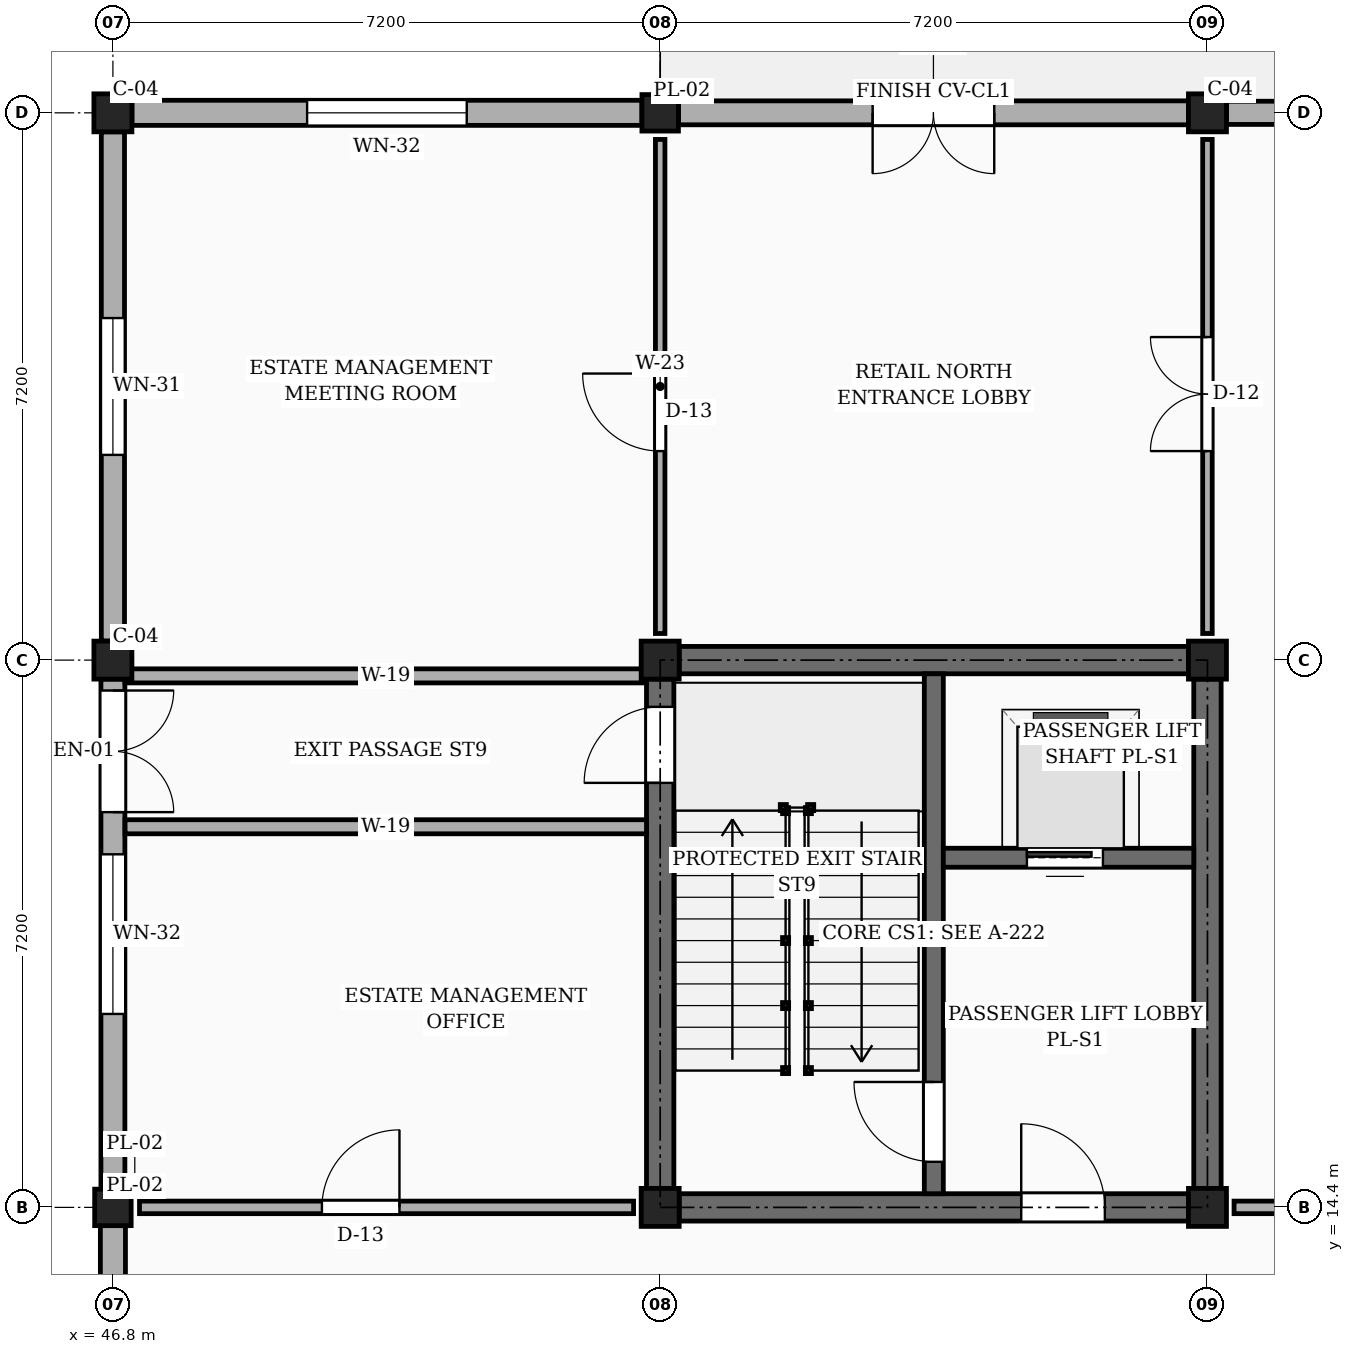
"""IFC4 building model, lengths in metres.
Left out: names, types, materials, properties, quantities, classifications, styles, units other than length and angle.
Written with IfcOpenShell. Run it as: python <this file> out.ifc"""

import sys

from ifc_helpers import new_model, si_unit, direction, frame, frame_2d, origin, origin_2d, place, context, subcontext, project, spatial, rectangle, extrude, element, fill, save


model = new_model("IFC4")
c1 = context("Model", 3, precision=1e-05, world=origin(), true_north=direction((0.0, 1.0)))
c2 = subcontext(c1, "Body", "Model", "MODEL_VIEW")
j1 = project(units=[si_unit("LENGTHUNIT", "METRE"), si_unit("PLANEANGLEUNIT", "RADIAN")], contexts=[c1])
p1 = place(None, origin())
s1 = spatial("IfcSite", under=j1, at=p1, CompositionType="ELEMENT")
p2 = place(p1, origin())
s2 = spatial("IfcBuilding", under=s1, at=p2, CompositionType="ELEMENT")
p3 = place(p2, origin())
s3 = spatial("IfcBuildingStorey", under=s2, at=p3, CompositionType="ELEMENT", Elevation=0.0)
p4 = place(p3, frame((46.8, 14.4, 0.0), z_axis=(0.0, 0.0, 1.0), x_axis=(1.0, 0.0, 0.0)))
e1 = element("IfcColumn", 1, at=p4, inside=s3, PredefinedType="PILASTER", context=c2, shape_type="SweptSolid", body=[
    extrude(rectangle(XDim=0.48, YDim=0.48, at=origin_2d()), origin(), (0.0, 0.0, 1.0), 4.5),
])
for number, where, z_axis, x_axis in (
    (2, (46.8, 21.6, 0.0), (0.0, 0.0, 1.0), (1.0, 0.0, 0.0)),
    (3, (46.8, 28.8, 0.0), (0.0, 0.0, 1.0), (1.0, 0.0, 0.0)),
    (4, (54.0, 14.4, 0.0), (0.0, 0.0, 1.0), (1.0, 0.0, 0.0)),
    (5, (54.0, 21.6, 0.0), (0.0, 0.0, 1.0), (1.0, 0.0, 0.0)),
):
    element("IfcColumn", number, at=place(p3, frame(where, z_axis=z_axis, x_axis=x_axis)), inside=s3, PredefinedType="COLUMN", context=c2, shape_type="SweptSolid", body=[
        extrude(rectangle(XDim=0.5, YDim=0.5, at=origin_2d()), origin(), (0.0, 0.0, 1.0), 4.5),
    ])
p5 = place(p3, frame((54.0, 28.8, 0.0), z_axis=(0.0, 0.0, 1.0), x_axis=(1.0, 0.0, 0.0)))
e6 = element("IfcColumn", 6, at=p5, inside=s3, PredefinedType="PILASTER", context=c2, shape_type="SweptSolid", body=[
    extrude(rectangle(XDim=0.48, YDim=0.48, at=origin_2d()), origin(), (0.0, 0.0, 1.0), 4.5),
])
for number, where, z_axis, x_axis in (
    (7, (61.2, 14.4, 0.0), (0.0, 0.0, 1.0), (1.0, 0.0, 0.0)),
    (8, (61.2, 21.6, 0.0), (0.0, 0.0, 1.0), (1.0, 0.0, 0.0)),
    (9, (61.2, 28.8, 0.0), (0.0, 0.0, 1.0), (1.0, 0.0, 0.0)),
):
    element("IfcColumn", number, at=place(p3, frame(where, z_axis=z_axis, x_axis=x_axis)), inside=s3, PredefinedType="COLUMN", context=c2, shape_type="SweptSolid", body=[
        extrude(rectangle(XDim=0.5, YDim=0.5, at=origin_2d()), origin(), (0.0, 0.0, 1.0), 4.5),
    ])
p6 = place(p3, frame((68.15, 28.8, 0.0), z_axis=(0.0, 0.0, 1.0), x_axis=(-1.0, 0.0, 0.0)))
e10 = element("IfcWall", 10, at=p6, inside=s3, PredefinedType="SOLIDWALL", context=c2, shape_type="SweptSolid", body=[
    extrude(rectangle(XDim=6.7, YDim=0.305, at=frame_2d((3.35, 0.0))), origin(), (0.0, 0.0, 1.0), 3.83),
])
p7 = place(p6, frame((2.45, 0.0, 0.85)))
e11 = element("IfcOpeningElement", 11, at=p7, cuts=e10, PredefinedType="OPENING", context=c2, shape_type="SweptSolid", body=[
    extrude(rectangle(XDim=1.8, YDim=2.1, at=frame_2d((0.9, 1.05))), frame((0.0, 0.163, 0.0), z_axis=(0.0, -1.0, 0.0), x_axis=(1.0, 0.0, 0.0)), (0.0, 0.0, 1.0), 0.325),
])
p8 = place(p3, frame((60.95, 28.8, 0.0), z_axis=(0.0, 0.0, 1.0), x_axis=(-1.0, 0.0, 0.0)))
e12 = element("IfcWall", 12, at=p8, inside=s3, PredefinedType="SOLIDWALL", context=c2, shape_type="SweptSolid", body=[
    extrude(rectangle(XDim=6.71, YDim=0.315, at=frame_2d((3.355, 0.0))), origin(), (0.0, 0.0, 1.0), 3.83),
])
p9 = place(p8, frame((2.555, 0.0, 0.0)))
e13 = element("IfcOpeningElement", 13, at=p9, cuts=e12, PredefinedType="OPENING", context=c2, shape_type="SweptSolid", body=[
    extrude(rectangle(XDim=1.6, YDim=2.25, at=frame_2d((0.8, 1.125))), frame((0.0, 0.167, 0.0), z_axis=(0.0, -1.0, 0.0), x_axis=(1.0, 0.0, 0.0)), (0.0, 0.0, 1.0), 0.335),
])
p10 = place(p3, frame((53.76, 28.8, 0.0), z_axis=(0.0, 0.0, 1.0), x_axis=(-1.0, 0.0, 0.0)))
e14 = element("IfcWall", 14, at=p10, inside=s3, PredefinedType="SOLIDWALL", context=c2, shape_type="SweptSolid", body=[
    extrude(rectangle(XDim=6.71, YDim=0.33, at=frame_2d((3.355, 0.0))), origin(), (0.0, 0.0, 1.0), 3.83),
])
p11 = place(p10, frame((2.305, 0.0, 0.85)))
e15 = element("IfcOpeningElement", 15, at=p11, cuts=e14, PredefinedType="OPENING", context=c2, shape_type="SweptSolid", body=[
    extrude(rectangle(XDim=2.1, YDim=2.1, at=frame_2d((1.05, 1.05))), frame((0.0, 0.175, 0.0), z_axis=(0.0, -1.0, 0.0), x_axis=(1.0, 0.0, 0.0)), (0.0, 0.0, 1.0), 0.35),
])
p12 = place(p3, frame((46.8, 28.55, 0.0), z_axis=(0.0, 0.0, 1.0), x_axis=(0.0, -1.0, 0.0)))
e16 = element("IfcWall", 16, at=p12, inside=s3, PredefinedType="SOLIDWALL", context=c2, shape_type="SweptSolid", body=[
    extrude(rectangle(XDim=6.7, YDim=0.305, at=frame_2d((3.35, 0.0))), origin(), (0.0, 0.0, 1.0), 3.83),
])
p13 = place(p12, frame((2.45, 0.0, 0.85)))
e17 = element("IfcOpeningElement", 17, at=p13, cuts=e16, PredefinedType="OPENING", context=c2, shape_type="SweptSolid", body=[
    extrude(rectangle(XDim=1.8, YDim=2.1, at=frame_2d((0.9, 1.05))), frame((0.0, 0.163, 0.0), z_axis=(0.0, -1.0, 0.0), x_axis=(1.0, 0.0, 0.0)), (0.0, 0.0, 1.0), 0.325),
])
p14 = place(p3, frame((46.8, 21.35, 0.0), z_axis=(0.0, 0.0, 1.0), x_axis=(0.0, -1.0, 0.0)))
e18 = element("IfcWall", 18, at=p14, inside=s3, PredefinedType="SOLIDWALL", context=c2, shape_type="SweptSolid", body=[
    extrude(rectangle(XDim=6.71, YDim=0.315, at=frame_2d((3.355, 0.0))), origin(), (0.0, 0.0, 1.0), 3.83),
])
p15 = place(p14, frame((2.305, 0.0, 0.85)))
e19 = element("IfcOpeningElement", 19, at=p15, cuts=e18, PredefinedType="OPENING", context=c2, shape_type="SweptSolid", body=[
    extrude(rectangle(XDim=2.1, YDim=2.1, at=frame_2d((1.05, 1.05))), frame((0.0, 0.167, 0.0), z_axis=(0.0, -1.0, 0.0), x_axis=(1.0, 0.0, 0.0)), (0.0, 0.0, 1.0), 0.335),
])
p16 = place(p14, frame((0.15, 0.0, 0.0)))
e20 = element("IfcOpeningElement", 20, at=p16, cuts=e18, PredefinedType="OPENING", context=c2, shape_type="SweptSolid", body=[
    extrude(rectangle(XDim=1.6, YDim=2.25, at=frame_2d((0.8, 1.125))), frame((0.0, 0.167, 0.0), z_axis=(0.0, -1.0, 0.0), x_axis=(1.0, 0.0, 0.0)), (0.0, 0.0, 1.0), 0.335),
])
p17 = place(p3, frame((46.8, 14.16, 0.0), z_axis=(0.0, 0.0, 1.0), x_axis=(0.0, -1.0, 0.0)))
e21 = element("IfcWall", 21, at=p17, inside=s3, PredefinedType="SOLIDWALL", context=c2, shape_type="SweptSolid", body=[
    extrude(rectangle(XDim=6.71, YDim=0.33, at=frame_2d((3.355, 0.0))), origin(), (0.0, 0.0, 1.0), 3.83),
])
p18 = place(p17, frame((3.39, 0.0, 0.85)))
e22 = element("IfcOpeningElement", 22, at=p18, cuts=e21, PredefinedType="OPENING", context=c2, shape_type="SweptSolid", body=[
    extrude(rectangle(XDim=1.8, YDim=2.1, at=frame_2d((0.9, 1.05))), frame((0.0, 0.175, 0.0), z_axis=(0.0, -1.0, 0.0), x_axis=(1.0, 0.0, 0.0)), (0.0, 0.0, 1.0), 0.35),
])
p19 = place(p3, frame((54.0, 14.65, 0.0), z_axis=(0.0, 0.0, 1.0), x_axis=(0.0, 1.0, 0.0)))
e23 = element("IfcWall", 23, at=p19, inside=s3, PredefinedType="SHEAR", context=c2, shape_type="SweptSolid", body=[
    extrude(rectangle(XDim=6.7, YDim=0.36, at=frame_2d((3.35, 0.0))), origin(), (0.0, 0.0, 1.0), 4.26),
])
p20 = place(p19, frame((5.335, 0.0, 0.0)))
e24 = element("IfcOpeningElement", 24, at=p20, cuts=e23, PredefinedType="OPENING", context=c2, shape_type="SweptSolid", body=[
    extrude(rectangle(XDim=1.0, YDim=2.15, at=frame_2d((0.5, 1.075))), frame((0.0, 0.19, 0.0), z_axis=(0.0, -1.0, 0.0), x_axis=(1.0, 0.0, 0.0)), (0.0, 0.0, 1.0), 0.38),
])
p21 = place(p3, frame((54.25, 21.6, 0.0), z_axis=(0.0, 0.0, 1.0), x_axis=(1.0, 0.0, 0.0)))
e25 = element("IfcWall", 25, at=p21, inside=s3, PredefinedType="SHEAR", context=c2, shape_type="SweptSolid", body=[
    extrude(rectangle(XDim=6.7, YDim=0.36, at=frame_2d((3.35, 0.0))), origin(), (0.0, 0.0, 1.0), 4.26),
])
p22 = place(p3, frame((61.2, 14.65, 0.0), z_axis=(0.0, 0.0, 1.0), x_axis=(0.0, 1.0, 0.0)))
e26 = element("IfcWall", 26, at=p22, inside=s3, PredefinedType="SHEAR", context=c2, shape_type="SweptSolid", body=[
    extrude(rectangle(XDim=6.7, YDim=0.36, at=frame_2d((3.35, 0.0))), origin(), (0.0, 0.0, 1.0), 4.26),
])
p23 = place(p3, frame((54.25, 14.4, 0.0), z_axis=(0.0, 0.0, 1.0), x_axis=(1.0, 0.0, 0.0)))
e27 = element("IfcWall", 27, at=p23, inside=s3, PredefinedType="SHEAR", context=c2, shape_type="SweptSolid", body=[
    extrude(rectangle(XDim=6.7, YDim=0.36, at=frame_2d((3.35, 0.0))), origin(), (0.0, 0.0, 1.0), 4.26),
])
p24 = place(p23, frame((4.5, 0.0, 0.0)))
e28 = element("IfcOpeningElement", 28, at=p24, cuts=e27, PredefinedType="OPENING", context=c2, shape_type="SweptSolid", body=[
    extrude(rectangle(XDim=1.1, YDim=2.15, at=frame_2d((0.55, 1.075))), frame((0.0, 0.19, 0.0), z_axis=(0.0, -1.0, 0.0), x_axis=(1.0, 0.0, 0.0)), (0.0, 0.0, 1.0), 0.38),
])
p25 = place(p3, frame((57.6, 14.58, 0.0), z_axis=(0.0, 0.0, 1.0), x_axis=(0.0, 1.0, 0.0)))
e29 = element("IfcWall", 29, at=p25, inside=s3, PredefinedType="SHEAR", context=c2, shape_type="SweptSolid", body=[
    extrude(rectangle(XDim=6.84, YDim=0.25, at=frame_2d((3.42, 0.0))), origin(), (0.0, 0.0, 1.0), 4.26),
])
p26 = place(p25, frame((0.42, 0.0, 0.0)))
e30 = element("IfcOpeningElement", 30, at=p26, cuts=e29, PredefinedType="OPENING", context=c2, shape_type="SweptSolid", body=[
    extrude(rectangle(XDim=1.05, YDim=2.15, at=frame_2d((0.525, 1.075))), frame((0.0, 0.135, 0.0), z_axis=(0.0, -1.0, 0.0), x_axis=(1.0, 0.0, 0.0)), (0.0, 0.0, 1.0), 0.27),
])
p27 = place(p3, frame((57.725, 19.0, 0.0), z_axis=(0.0, 0.0, 1.0), x_axis=(1.0, 0.0, 0.0)))
e31 = element("IfcWall", 31, at=p27, inside=s3, PredefinedType="SHEAR", context=c2, shape_type="SweptSolid", body=[
    extrude(rectangle(XDim=3.295, YDim=0.25, at=frame_2d((1.647, 0.0))), origin(), (0.0, 0.0, 1.0), 4.26),
])
p28 = place(p27, frame((1.1, 0.0, 0.0)))
e32 = element("IfcOpeningElement", 32, at=p28, cuts=e31, PredefinedType="OPENING", context=c2, shape_type="SweptSolid", body=[
    extrude(rectangle(XDim=1.0, YDim=2.2, at=frame_2d((0.5, 1.1))), frame((0.0, 0.135, 0.0), z_axis=(0.0, -1.0, 0.0), x_axis=(1.0, 0.0, 0.0)), (0.0, 0.0, 1.0), 0.27),
])
p29 = place(p3, frame((47.15, 14.4, 0.0), z_axis=(0.0, 0.0, 1.0), x_axis=(1.0, 0.0, 0.0)))
e33 = element("IfcWall", 33, at=p29, inside=s3, PredefinedType="PARTITIONING", context=c2, shape_type="SweptSolid", body=[
    extrude(rectangle(XDim=6.5, YDim=0.165, at=frame_2d((3.25, 0.0))), origin(), (0.0, 0.0, 1.0), 3.41),
])
p30 = place(p29, frame((2.4, 0.0, 0.0)))
e34 = element("IfcOpeningElement", 34, at=p30, cuts=e33, PredefinedType="OPENING", context=c2, shape_type="SweptSolid", body=[
    extrude(rectangle(XDim=1.02, YDim=2.15, at=frame_2d((0.51, 1.075))), frame((0.0, 0.093, 0.0), z_axis=(0.0, -1.0, 0.0), x_axis=(1.0, 0.0, 0.0)), (0.0, 0.0, 1.0), 0.185),
])
p31 = place(p3, frame((61.55, 14.4, 0.0), z_axis=(0.0, 0.0, 1.0), x_axis=(1.0, 0.0, 0.0)))
e35 = element("IfcWall", 35, at=p31, inside=s3, PredefinedType="PARTITIONING", context=c2, shape_type="SweptSolid", body=[
    extrude(rectangle(XDim=13.7, YDim=0.165, at=frame_2d((6.85, 0.0))), origin(), (0.0, 0.0, 1.0), 3.41),
])
p32 = place(p31, frame((2.4, 0.0, 0.0)))
e36 = element("IfcOpeningElement", 36, at=p32, cuts=e35, PredefinedType="OPENING", context=c2, shape_type="SweptSolid", body=[
    extrude(rectangle(XDim=1.5, YDim=2.25, at=frame_2d((0.75, 1.125))), frame((0.0, 0.093, 0.0), z_axis=(0.0, -1.0, 0.0), x_axis=(1.0, 0.0, 0.0)), (0.0, 0.0, 1.0), 0.185),
])
p33 = place(p3, frame((54.0, 21.95, 0.0), z_axis=(0.0, 0.0, 1.0), x_axis=(0.0, 1.0, 0.0)))
e37 = element("IfcWall", 37, at=p33, inside=s3, PredefinedType="PARTITIONING", context=c2, shape_type="SweptSolid", body=[
    extrude(rectangle(XDim=6.5, YDim=0.125, at=frame_2d((3.25, 0.0))), origin(), (0.0, 0.0, 1.0), 3.41),
])
p34 = place(p33, frame((2.4, 0.0, 0.0)))
e38 = element("IfcOpeningElement", 38, at=p34, cuts=e37, PredefinedType="OPENING", context=c2, shape_type="SweptSolid", body=[
    extrude(rectangle(XDim=1.02, YDim=2.15, at=frame_2d((0.51, 1.075))), frame((0.0, 0.073, 0.0), z_axis=(0.0, -1.0, 0.0), x_axis=(1.0, 0.0, 0.0)), (0.0, 0.0, 1.0), 0.145),
])
p35 = place(p3, frame((61.2, 21.95, 0.0), z_axis=(0.0, 0.0, 1.0), x_axis=(0.0, 1.0, 0.0)))
e39 = element("IfcWall", 39, at=p35, inside=s3, PredefinedType="PARTITIONING", context=c2, shape_type="SweptSolid", body=[
    extrude(rectangle(XDim=6.5, YDim=0.125, at=frame_2d((3.25, 0.0))), origin(), (0.0, 0.0, 1.0), 3.41),
])
p36 = place(p35, frame((2.4, 0.0, 0.0)))
e40 = element("IfcOpeningElement", 40, at=p36, cuts=e39, PredefinedType="OPENING", context=c2, shape_type="SweptSolid", body=[
    extrude(rectangle(XDim=1.5, YDim=2.25, at=frame_2d((0.75, 1.125))), frame((0.0, 0.073, 0.0), z_axis=(0.0, -1.0, 0.0), x_axis=(1.0, 0.0, 0.0)), (0.0, 0.0, 1.0), 0.145),
])
for number, where, z_axis, x_axis in (
    (41, (46.96, 19.407, 0.0), (0.0, 0.0, 1.0), (1.0, 0.0, 0.0)),
    (42, (46.96, 21.393, 0.0), (0.0, 0.0, 1.0), (1.0, 0.0, 0.0)),
):
    element("IfcWall", number, at=place(p3, frame(where, z_axis=z_axis, x_axis=x_axis)), inside=s3, PredefinedType="PARTITIONING", context=c2, shape_type="SweptSolid", body=[
        extrude(rectangle(XDim=6.86, YDim=0.185, at=frame_2d((3.43, 0.0))), origin(), (0.0, 0.0, 1.0), 3.41),
    ])
p37 = place(p9, frame((1.6, 0.0, 0.0), z_axis=(0.0, 0.0, 1.0), x_axis=(-1.0, 0.0, 0.0)))
e43 = element("IfcDoor", 43, at=p37, inside=s3, OperationType="DOUBLE_DOOR_SINGLE_SWING", PredefinedType="DOOR", context=c2, shape_type="SweptSolid", body=[
    extrude(rectangle(XDim=1.6, YDim=2.25, at=frame_2d((0.8, 1.125))), frame((0.0, 0.025, 0.0), z_axis=(0.0, -1.0, 0.0), x_axis=(1.0, 0.0, 0.0)), (0.0, 0.0, 1.0), 0.05),
])
fill(e13, e43)
p38 = place(p11, origin())
e44 = element("IfcWindow", 44, at=p38, inside=s3, PartitioningType="SINGLE_PANEL", PredefinedType="WINDOW", context=c2, shape_type="SweptSolid", body=[
    extrude(rectangle(XDim=2.1, YDim=2.1, at=frame_2d((1.05, 1.05))), frame((0.0, 0.03, 0.0), z_axis=(0.0, -1.0, 0.0), x_axis=(1.0, 0.0, 0.0)), (0.0, 0.0, 1.0), 0.06),
])
fill(e15, e44)
p39 = place(p13, origin())
e45 = element("IfcWindow", 45, at=p39, inside=s3, PartitioningType="SINGLE_PANEL", PredefinedType="WINDOW", context=c2, shape_type="SweptSolid", body=[
    extrude(rectangle(XDim=1.8, YDim=2.1, at=frame_2d((0.9, 1.05))), frame((0.0, 0.03, 0.0), z_axis=(0.0, -1.0, 0.0), x_axis=(1.0, 0.0, 0.0)), (0.0, 0.0, 1.0), 0.06),
])
fill(e17, e45)
p40 = place(p15, origin())
e46 = element("IfcWindow", 46, at=p40, inside=s3, PartitioningType="SINGLE_PANEL", PredefinedType="WINDOW", context=c2, shape_type="SweptSolid", body=[
    extrude(rectangle(XDim=2.1, YDim=2.1, at=frame_2d((1.05, 1.05))), frame((0.0, 0.03, 0.0), z_axis=(0.0, -1.0, 0.0), x_axis=(1.0, 0.0, 0.0)), (0.0, 0.0, 1.0), 0.06),
])
fill(e19, e46)
p41 = place(p24, frame((1.1, 0.0, 0.0), z_axis=(0.0, 0.0, 1.0), x_axis=(-1.0, 0.0, 0.0)))
e47 = element("IfcDoor", 47, at=p41, inside=s3, OperationType="SINGLE_SWING_LEFT", PredefinedType="DOOR", context=c2, shape_type="SweptSolid", body=[
    extrude(rectangle(XDim=1.1, YDim=2.15, at=frame_2d((0.55, 1.075))), frame((0.0, 0.025, 0.0), z_axis=(0.0, -1.0, 0.0), x_axis=(1.0, 0.0, 0.0)), (0.0, 0.0, 1.0), 0.05),
])
fill(e28, e47)
p42 = place(p26, frame((1.05, 0.0, 0.0), z_axis=(0.0, 0.0, 1.0), x_axis=(-1.0, 0.0, 0.0)))
e48 = element("IfcDoor", 48, at=p42, inside=s3, OperationType="SINGLE_SWING_RIGHT", PredefinedType="DOOR", context=c2, shape_type="SweptSolid", body=[
    extrude(rectangle(XDim=1.05, YDim=2.15, at=frame_2d((0.525, 1.075))), frame((0.0, 0.025, 0.0), z_axis=(0.0, -1.0, 0.0), x_axis=(1.0, 0.0, 0.0)), (0.0, 0.0, 1.0), 0.05),
])
fill(e30, e48)
p43 = place(p28, origin())
e49 = element("IfcDoor", 49, at=p43, inside=s3, OperationType="SLIDING_TO_LEFT", PredefinedType="DOOR", context=c2, shape_type="SweptSolid", body=[
    extrude(rectangle(XDim=1.0, YDim=2.2, at=frame_2d((0.5, 1.1))), frame((0.0, 0.025, 0.0), z_axis=(0.0, -1.0, 0.0), x_axis=(1.0, 0.0, 0.0)), (0.0, 0.0, 1.0), 0.05),
])
fill(e32, e49)
p44 = place(p30, origin())
e50 = element("IfcDoor", 50, at=p44, inside=s3, OperationType="SINGLE_SWING_RIGHT", PredefinedType="DOOR", context=c2, shape_type="SweptSolid", body=[
    extrude(rectangle(XDim=1.02, YDim=2.15, at=frame_2d((0.51, 1.075))), frame((0.0, 0.025, 0.0), z_axis=(0.0, -1.0, 0.0), x_axis=(1.0, 0.0, 0.0)), (0.0, 0.0, 1.0), 0.05),
])
fill(e34, e50)
p45 = place(p34, origin())
e51 = element("IfcDoor", 51, at=p45, inside=s3, OperationType="SINGLE_SWING_RIGHT", PredefinedType="DOOR", context=c2, shape_type="SweptSolid", body=[
    extrude(rectangle(XDim=1.02, YDim=2.15, at=frame_2d((0.51, 1.075))), frame((0.0, 0.025, 0.0), z_axis=(0.0, -1.0, 0.0), x_axis=(1.0, 0.0, 0.0)), (0.0, 0.0, 1.0), 0.05),
])
fill(e38, e51)
p46 = place(p36, origin())
e52 = element("IfcDoor", 52, at=p46, inside=s3, OperationType="DOUBLE_DOOR_SINGLE_SWING", PredefinedType="DOOR", context=c2, shape_type="SweptSolid", body=[
    extrude(rectangle(XDim=1.5, YDim=2.25, at=frame_2d((0.75, 1.125))), frame((0.0, 0.025, 0.0), z_axis=(0.0, -1.0, 0.0), x_axis=(1.0, 0.0, 0.0)), (0.0, 0.0, 1.0), 0.05),
])
fill(e40, e52)
p47 = place(p20, origin())
e53 = element("IfcDoor", 53, at=p47, inside=s3, OperationType="SINGLE_SWING_LEFT", PredefinedType="DOOR", context=c2, shape_type="SweptSolid", body=[
    extrude(rectangle(XDim=1.0, YDim=2.15, at=frame_2d((0.5, 1.075))), frame((0.0, 0.025, 0.0), z_axis=(0.0, -1.0, 0.0), x_axis=(1.0, 0.0, 0.0)), (0.0, 0.0, 1.0), 0.05),
])
fill(e24, e53)
p48 = place(p16, frame((1.6, 0.0, 0.0), z_axis=(0.0, 0.0, 1.0), x_axis=(-1.0, 0.0, 0.0)))
e54 = element("IfcDoor", 54, at=p48, inside=s3, OperationType="DOUBLE_DOOR_SINGLE_SWING", PredefinedType="DOOR", context=c2, shape_type="SweptSolid", body=[
    extrude(rectangle(XDim=1.6, YDim=2.25, at=frame_2d((0.8, 1.125))), frame((0.0, 0.025, 0.0), z_axis=(0.0, -1.0, 0.0), x_axis=(1.0, 0.0, 0.0)), (0.0, 0.0, 1.0), 0.05),
])
fill(e20, e54)
save(model, sys.argv[1])
